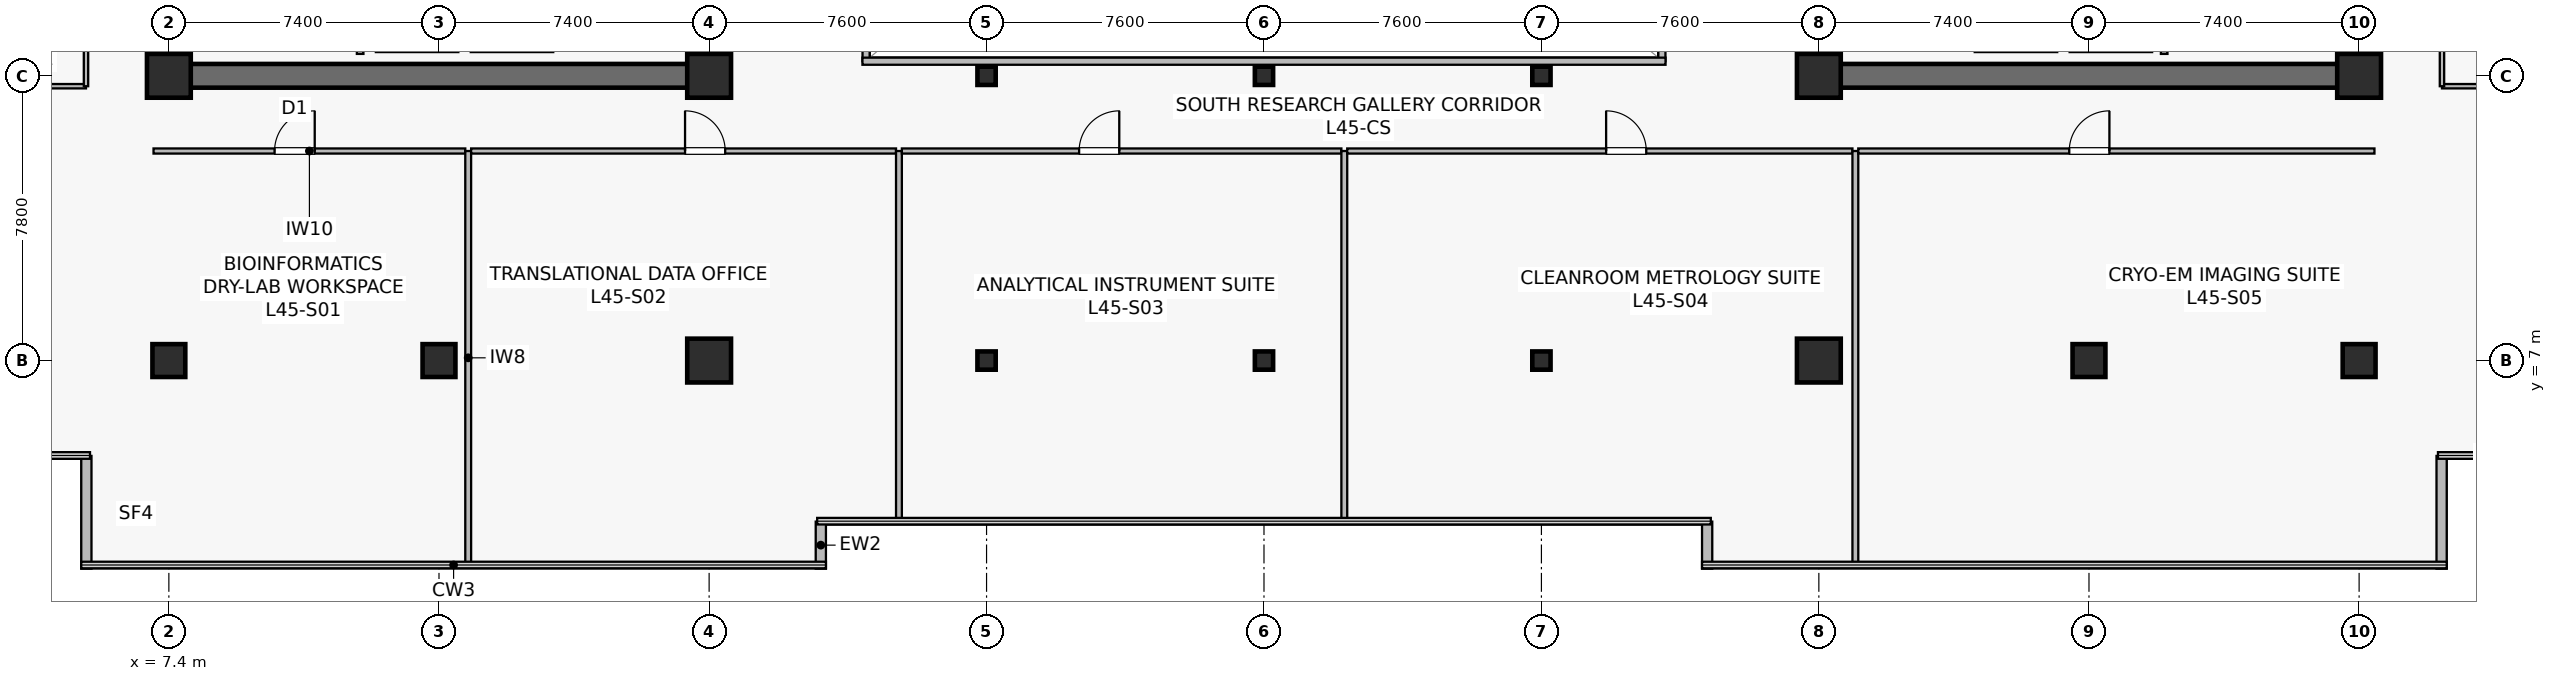
"""IFC4 building model, lengths in metres.
Left out: names, types, materials, properties, quantities, classifications, styles, units other than length and angle.
Written with IfcOpenShell. Run it as: python <this file> out.ifc"""

import sys

from ifc_helpers import new_model, si_unit, direction, frame, frame_2d, origin, origin_2d, place, context, subcontext, project, spatial, rectangle, hollow_rectangle, extrude, source, transform, mapped, element, fill, save


model = new_model("IFC4")
c1 = context("Model", 3, precision=1e-05, world=origin(), true_north=direction((0.0, 1.0)))
c2 = subcontext(c1, "Body", "Model", "MODEL_VIEW")
j1 = project(units=[si_unit("LENGTHUNIT", "METRE"), si_unit("PLANEANGLEUNIT", "RADIAN")], contexts=[c1])
p1 = place(None, origin())
s1 = spatial("IfcSite", under=j1, at=p1, CompositionType="ELEMENT")
p2 = place(p1, origin())
s2 = spatial("IfcBuilding", under=s1, at=p2, CompositionType="ELEMENT")
p3 = place(p2, frame((0.0, 0.0, 187.1)))
s3 = spatial("IfcBuildingStorey", under=s2, at=p3, CompositionType="ELEMENT", Elevation=187.1)
p4 = place(p3, frame((7.075, 14.8, 0.0), z_axis=(0.0, 0.0, 1.0), x_axis=(1.0, 0.0, 0.0)))
e1 = element("IfcWall", 1, at=p4, inside=s3, PredefinedType="SHEAR", context=c2, shape_type="SweptSolid", body=[
    extrude(rectangle(XDim=15.45, YDim=0.65, at=frame_2d((7.725, 0.0))), origin(), (0.0, 0.0, 1.0), 3.79),
])
p5 = place(p3, frame((7.4, 15.125, 0.0), z_axis=(0.0, 0.0, 1.0), x_axis=(0.0, 1.0, 0.0)))
e2 = element("IfcWall", 2, at=p5, inside=s3, PredefinedType="SHEAR", context=c2, shape_type="SweptSolid", body=[
    extrude(rectangle(XDim=18.35, YDim=0.65, at=frame_2d((9.175, 0.0))), origin(), (0.0, 0.0, 1.0), 3.79),
])
p6 = place(p3, frame((22.2, 15.125, 0.0), z_axis=(0.0, 0.0, 1.0), x_axis=(0.0, 1.0, 0.0)))
e3 = element("IfcWall", 3, at=p6, inside=s3, PredefinedType="SHEAR", context=c2, shape_type="SweptSolid", body=[
    extrude(rectangle(XDim=18.35, YDim=0.65, at=frame_2d((9.175, 0.0))), origin(), (0.0, 0.0, 1.0), 3.79),
])
p7 = place(p6, frame((3.425, 0.0, 0.0)))
e4 = element("IfcOpeningElement", 4, at=p7, cuts=e3, PredefinedType="OPENING", context=c2, shape_type="SweptSolid", body=[
    extrude(rectangle(XDim=1.42, YDim=2.2, at=frame_2d((0.71, 1.1))), frame((0.0, 0.335, 0.0), z_axis=(0.0, -1.0, 0.0), x_axis=(1.0, 0.0, 0.0)), (0.0, 0.0, 1.0), 0.67),
])
p8 = place(p3, frame((52.275, 14.8, 0.0), z_axis=(0.0, 0.0, 1.0), x_axis=(1.0, 0.0, 0.0)))
e5 = element("IfcWall", 5, at=p8, inside=s3, PredefinedType="SHEAR", context=c2, shape_type="SweptSolid", body=[
    extrude(rectangle(XDim=15.45, YDim=0.65, at=frame_2d((7.725, 0.0))), origin(), (0.0, 0.0, 1.0), 3.79),
])
p9 = place(p3, frame((52.6, 15.125, 0.0), z_axis=(0.0, 0.0, 1.0), x_axis=(0.0, 1.0, 0.0)))
e6 = element("IfcWall", 6, at=p9, inside=s3, PredefinedType="SHEAR", context=c2, shape_type="SweptSolid", body=[
    extrude(rectangle(XDim=18.35, YDim=0.65, at=frame_2d((9.175, 0.0))), origin(), (0.0, 0.0, 1.0), 3.79),
])
p10 = place(p9, frame((3.425, 0.0, 0.0)))
e7 = element("IfcOpeningElement", 7, at=p10, cuts=e6, PredefinedType="OPENING", context=c2, shape_type="SweptSolid", body=[
    extrude(rectangle(XDim=1.42, YDim=2.2, at=frame_2d((0.71, 1.1))), frame((0.0, 0.335, 0.0), z_axis=(0.0, -1.0, 0.0), x_axis=(1.0, 0.0, 0.0)), (0.0, 0.0, 1.0), 0.67),
])
p11 = place(p3, frame((67.4, 15.125, 0.0), z_axis=(0.0, 0.0, 1.0), x_axis=(0.0, 1.0, 0.0)))
e8 = element("IfcWall", 8, at=p11, inside=s3, PredefinedType="SHEAR", context=c2, shape_type="SweptSolid", body=[
    extrude(rectangle(XDim=18.35, YDim=0.65, at=frame_2d((9.175, 0.0))), origin(), (0.0, 0.0, 1.0), 3.79),
])
m1 = source(origin(), c2, "Body", "SweptSolid", [
    extrude(rectangle(XDim=0.9, YDim=0.9, at=origin_2d()), origin(), (0.0, 0.0, 1.0), 4.1),
])
p12 = place(p3, frame((14.8, 7.0, 0.0), z_axis=(0.0, 0.0, 1.0), x_axis=(1.0, 0.0, 0.0)))
e9 = element("IfcColumn", 9, at=p12, inside=s3, PredefinedType="COLUMN", context=c2, shape_type="MappedRepresentation", body=[
    mapped(m1, transform((0.0, 0.0, 0.0), scale=1.0)),
])
m2 = source(origin(), c2, "Body", "SweptSolid", [
    extrude(rectangle(XDim=1.2, YDim=1.2, at=origin_2d()), origin(), (0.0, 0.0, 1.0), 4.1),
])
for number, where, z_axis, x_axis in (
    (10, (22.2, 7.0, 0.0), (0.0, 0.0, 1.0), (1.0, 0.0, 0.0)),
    (11, (7.4, 14.8, 0.0), (0.0, 0.0, 1.0), (1.0, 0.0, 0.0)),
    (12, (22.2, 14.8, 0.0), (0.0, 0.0, 1.0), (1.0, 0.0, 0.0)),
    (13, (52.6, 7.0, 0.0), (0.0, 0.0, 1.0), (1.0, 0.0, 0.0)),
):
    element("IfcColumn", number, at=place(p3, frame(where, z_axis=z_axis, x_axis=x_axis)), inside=s3, PredefinedType="COLUMN", context=c2, shape_type="MappedRepresentation", body=[
        mapped(m2, transform((0.0, 0.0, 0.0), scale=1.0)),
    ])
p13 = place(p3, frame((60.0, 7.0, 0.0), z_axis=(0.0, 0.0, 1.0), x_axis=(1.0, 0.0, 0.0)))
e14 = element("IfcColumn", 14, at=p13, inside=s3, PredefinedType="COLUMN", context=c2, shape_type="MappedRepresentation", body=[
    mapped(m1, transform((0.0, 0.0, 0.0), scale=1.0)),
])
for number, where, z_axis, x_axis in (
    (15, (52.6, 14.8, 0.0), (0.0, 0.0, 1.0), (1.0, 0.0, 0.0)),
    (16, (67.4, 14.8, 0.0), (0.0, 0.0, 1.0), (1.0, 0.0, 0.0)),
):
    element("IfcColumn", number, at=place(p3, frame(where, z_axis=z_axis, x_axis=x_axis)), inside=s3, PredefinedType="COLUMN", context=c2, shape_type="MappedRepresentation", body=[
        mapped(m2, transform((0.0, 0.0, 0.0), scale=1.0)),
    ])
for number, where, z_axis, x_axis in (
    (17, (7.4, 7.0, 0.0), (0.0, 0.0, 1.0), (1.0, 0.0, 0.0)),
    (18, (67.4, 7.0, 0.0), (0.0, 0.0, 1.0), (1.0, 0.0, 0.0)),
):
    element("IfcColumn", number, at=place(p3, frame(where, z_axis=z_axis, x_axis=x_axis)), inside=s3, PredefinedType="COLUMN", context=c2, shape_type="MappedRepresentation", body=[
        mapped(m1, transform((0.0, 0.0, 0.0), scale=1.0)),
    ])
m3 = source(origin(), c2, "Body", "SweptSolid", [
    extrude(hollow_rectangle(XDim=0.5, YDim=0.5, WallThickness=0.022, at=origin_2d()), origin(), (0.0, 0.0, 1.0), 4.1),
])
for number, where, z_axis, x_axis in (
    (19, (29.8, 7.0, 0.0), (0.0, 0.0, 1.0), (1.0, 0.0, 0.0)),
    (20, (29.8, 14.8, 0.0), (0.0, 0.0, 1.0), (1.0, 0.0, 0.0)),
    (21, (37.4, 7.0, 0.0), (0.0, 0.0, 1.0), (1.0, 0.0, 0.0)),
    (22, (37.4, 14.8, 0.0), (0.0, 0.0, 1.0), (1.0, 0.0, 0.0)),
    (23, (45.0, 7.0, 0.0), (0.0, 0.0, 1.0), (1.0, 0.0, 0.0)),
    (24, (45.0, 14.8, 0.0), (0.0, 0.0, 1.0), (1.0, 0.0, 0.0)),
):
    element("IfcColumn", number, at=place(p3, frame(where, z_axis=z_axis, x_axis=x_axis)), inside=s3, PredefinedType="COLUMN", context=c2, shape_type="MappedRepresentation", body=[
        mapped(m3, transform((0.0, 0.0, 0.0), scale=1.0)),
    ])
for number, where, z_axis, x_axis in (
    (25, (25.26, 1.3, 0.0), (0.0, 0.0, 1.0), (0.0, 1.0, 0.0)),
    (26, (49.54, 2.588, 0.0), (0.0, 0.0, 1.0), (0.0, -1.0, 0.0)),
):
    element("IfcWall", number, at=place(p3, frame(where, z_axis=z_axis, x_axis=x_axis)), inside=s3, PredefinedType="STANDARD", context=c2, shape_type="SweptSolid", body=[
        extrude(rectangle(XDim=1.288, YDim=0.28, at=frame_2d((0.644, 0.0))), origin(), (0.0, 0.0, 1.0), 3.79),
    ])
for number, where, z_axis, x_axis in (
    (27, (69.66, 1.3, 0.0), (0.0, 0.0, 1.0), (0.0, 1.0, 0.0)),
    (28, (5.14, 4.388, 0.0), (0.0, 0.0, 1.0), (0.0, -1.0, 0.0)),
):
    element("IfcWall", number, at=place(p3, frame(where, z_axis=z_axis, x_axis=x_axis)), inside=s3, PredefinedType="STANDARD", context=c2, shape_type="SweptSolid", body=[
        extrude(rectangle(XDim=3.088, YDim=0.28, at=frame_2d((1.544, 0.0))), origin(), (0.0, 0.0, 1.0), 3.79),
    ])
p14 = place(p3, frame((13.07, 15.55, 0.0), z_axis=(0.0, 0.0, 1.0), x_axis=(1.0, 0.0, 0.0)))
e29 = element("IfcWall", 29, at=p14, inside=s3, PredefinedType="SOLIDWALL", context=c2, shape_type="SweptSolid", body=[
    extrude(rectangle(XDim=2.26, YDim=0.2, at=frame_2d((1.13, 0.0))), origin(), (0.0, 0.0, 1.0), 3.187),
])
p15 = place(p3, frame((15.67, 15.55, 0.0), z_axis=(0.0, 0.0, 1.0), x_axis=(1.0, 0.0, 0.0)))
e30 = element("IfcWall", 30, at=p15, inside=s3, PredefinedType="SOLIDWALL", context=c2, shape_type="SweptSolid", body=[
    extrude(rectangle(XDim=2.26, YDim=0.2, at=frame_2d((1.13, 0.0))), origin(), (0.0, 0.0, 1.0), 3.79),
])
p16 = place(p3, frame((12.64, 15.4, 0.0), z_axis=(0.0, 0.0, 1.0), x_axis=(0.0, 1.0, 0.0)))
e31 = element("IfcWall", 31, at=p16, inside=s3, PredefinedType="SOLIDWALL", context=c2, shape_type="SweptSolid", body=[
    extrude(rectangle(XDim=2.4, YDim=0.18, at=frame_2d((1.2, 0.0))), origin(), (0.0, 0.0, 1.0), 3.79),
])
p17 = place(p3, frame((59.47, 15.55, 0.0), z_axis=(0.0, 0.0, 1.0), x_axis=(1.0, 0.0, 0.0)))
e32 = element("IfcWall", 32, at=p17, inside=s3, PredefinedType="SOLIDWALL", context=c2, shape_type="SweptSolid", body=[
    extrude(rectangle(XDim=2.26, YDim=0.2, at=frame_2d((1.13, 0.0))), origin(), (0.0, 0.0, 1.0), 3.187),
])
p18 = place(p3, frame((56.87, 15.55, 0.0), z_axis=(0.0, 0.0, 1.0), x_axis=(1.0, 0.0, 0.0)))
e33 = element("IfcWall", 33, at=p18, inside=s3, PredefinedType="SOLIDWALL", context=c2, shape_type="SweptSolid", body=[
    extrude(rectangle(XDim=2.26, YDim=0.2, at=frame_2d((1.13, 0.0))), origin(), (0.0, 0.0, 1.0), 3.79),
])
p19 = place(p3, frame((62.06, 15.4, 0.0), z_axis=(0.0, 0.0, 1.0), x_axis=(0.0, 1.0, 0.0)))
e34 = element("IfcWall", 34, at=p19, inside=s3, PredefinedType="SOLIDWALL", context=c2, shape_type="SweptSolid", body=[
    extrude(rectangle(XDim=2.4, YDim=0.18, at=frame_2d((1.2, 0.0))), origin(), (0.0, 0.0, 1.0), 3.79),
])
p20 = place(p3, frame((26.5, 15.2, 0.0), z_axis=(0.0, 0.0, 1.0), x_axis=(0.0, 1.0, 0.0)))
e35 = element("IfcWall", 35, at=p20, inside=s3, PredefinedType="SOLIDWALL", context=c2, shape_type="SweptSolid", body=[
    extrude(rectangle(XDim=18.2, YDim=0.195, at=frame_2d((9.1, 0.0))), origin(), (0.0, 0.0, 1.0), 3.79),
])
p21 = place(p20, frame((1.8, 0.0, 0.9)))
e36 = element("IfcOpeningElement", 36, at=p21, cuts=e35, PredefinedType="OPENING", context=c2, shape_type="SweptSolid", body=[
    extrude(rectangle(XDim=1.2, YDim=1.35, at=frame_2d((0.6, 0.675))), frame((0.0, 0.107, 0.0), z_axis=(0.0, -1.0, 0.0), x_axis=(1.0, 0.0, 0.0)), (0.0, 0.0, 1.0), 0.215),
])
p22 = place(p20, frame((13.2, 0.0, 0.9)))
e37 = element("IfcOpeningElement", 37, at=p22, cuts=e35, PredefinedType="OPENING", context=c2, shape_type="SweptSolid", body=[
    extrude(rectangle(XDim=1.2, YDim=1.35, at=frame_2d((0.6, 0.675))), frame((0.0, 0.107, 0.0), z_axis=(0.0, -1.0, 0.0), x_axis=(1.0, 0.0, 0.0)), (0.0, 0.0, 1.0), 0.215),
])
p23 = place(p3, frame((48.3, 15.2, 0.0), z_axis=(0.0, 0.0, 1.0), x_axis=(0.0, 1.0, 0.0)))
e38 = element("IfcWall", 38, at=p23, inside=s3, PredefinedType="SOLIDWALL", context=c2, shape_type="SweptSolid", body=[
    extrude(rectangle(XDim=18.2, YDim=0.195, at=frame_2d((9.1, 0.0))), origin(), (0.0, 0.0, 1.0), 3.79),
])
p24 = place(p23, frame((1.8, 0.0, 0.9)))
e39 = element("IfcOpeningElement", 39, at=p24, cuts=e38, PredefinedType="OPENING", context=c2, shape_type="SweptSolid", body=[
    extrude(rectangle(XDim=1.2, YDim=1.35, at=frame_2d((0.6, 0.675))), frame((0.0, 0.107, 0.0), z_axis=(0.0, -1.0, 0.0), x_axis=(1.0, 0.0, 0.0)), (0.0, 0.0, 1.0), 0.215),
])
p25 = place(p23, frame((13.2, 0.0, 0.9)))
e40 = element("IfcOpeningElement", 40, at=p25, cuts=e38, PredefinedType="OPENING", context=c2, shape_type="SweptSolid", body=[
    extrude(rectangle(XDim=1.2, YDim=1.35, at=frame_2d((0.6, 0.675))), frame((0.0, 0.107, 0.0), z_axis=(0.0, -1.0, 0.0), x_axis=(1.0, 0.0, 0.0)), (0.0, 0.0, 1.0), 0.215),
])
p26 = place(p3, frame((26.4, 15.2, 0.0), z_axis=(0.0, 0.0, 1.0), x_axis=(1.0, 0.0, 0.0)))
e41 = element("IfcWall", 41, at=p26, inside=s3, PredefinedType="SOLIDWALL", context=c2, shape_type="SweptSolid", body=[
    extrude(rectangle(XDim=22.0, YDim=0.195, at=frame_2d((11.0, 0.0))), origin(), (0.0, 0.0, 1.0), 3.79),
])
p27 = place(p3, frame((6.98, 12.74, 0.0), z_axis=(0.0, 0.0, 1.0), x_axis=(1.0, 0.0, 0.0)))
e42 = element("IfcWall", 42, at=p27, inside=s3, PredefinedType="PARTITIONING", context=c2, shape_type="SweptSolid", body=[
    extrude(rectangle(XDim=8.54, YDim=0.14, at=frame_2d((4.27, 0.0))), origin(), (0.0, 0.0, 1.0), 3.187),
])
p28 = place(p27, frame((3.316, 0.0, 0.0)))
e43 = element("IfcOpeningElement", 43, at=p28, cuts=e42, PredefinedType="OPENING", context=c2, shape_type="SweptSolid", body=[
    extrude(rectangle(XDim=1.1, YDim=2.18, at=frame_2d((0.55, 1.09))), frame((0.0, 0.08, 0.0), z_axis=(0.0, -1.0, 0.0), x_axis=(1.0, 0.0, 0.0)), (0.0, 0.0, 1.0), 0.16),
])
p29 = place(p3, frame((15.6, 1.41, 0.0), z_axis=(0.0, 0.0, 1.0), x_axis=(0.0, 1.0, 0.0)))
e44 = element("IfcWall", 44, at=p29, inside=s3, PredefinedType="PARTITIONING", context=c2, shape_type="SweptSolid", body=[
    extrude(rectangle(XDim=11.33, YDim=0.16, at=frame_2d((5.665, 0.0))), origin(), (0.0, 0.0, 1.0), 3.075),
])
p30 = place(p3, frame((15.68, 12.74, 0.0), z_axis=(0.0, 0.0, 1.0), x_axis=(1.0, 0.0, 0.0)))
e45 = element("IfcWall", 45, at=p30, inside=s3, PredefinedType="PARTITIONING", context=c2, shape_type="SweptSolid", body=[
    extrude(rectangle(XDim=11.64, YDim=0.14, at=frame_2d((5.82, 0.0))), origin(), (0.0, 0.0, 1.0), 3.187),
])
p31 = place(p30, frame((5.86, 0.0, 0.0)))
e46 = element("IfcOpeningElement", 46, at=p31, cuts=e45, PredefinedType="OPENING", context=c2, shape_type="SweptSolid", body=[
    extrude(rectangle(XDim=1.1, YDim=2.18, at=frame_2d((0.55, 1.09))), frame((0.0, 0.08, 0.0), z_axis=(0.0, -1.0, 0.0), x_axis=(1.0, 0.0, 0.0)), (0.0, 0.0, 1.0), 0.16),
])
p32 = place(p3, frame((27.4, 2.61, 0.0), z_axis=(0.0, 0.0, 1.0), x_axis=(0.0, 1.0, 0.0)))
e47 = element("IfcWall", 47, at=p32, inside=s3, PredefinedType="PARTITIONING", context=c2, shape_type="SweptSolid", body=[
    extrude(rectangle(XDim=10.13, YDim=0.16, at=frame_2d((5.065, 0.0))), origin(), (0.0, 0.0, 1.0), 3.075),
])
p33 = place(p3, frame((27.48, 12.74, 0.0), z_axis=(0.0, 0.0, 1.0), x_axis=(1.0, 0.0, 0.0)))
e48 = element("IfcWall", 48, at=p33, inside=s3, PredefinedType="PARTITIONING", context=c2, shape_type="SweptSolid", body=[
    extrude(rectangle(XDim=12.04, YDim=0.14, at=frame_2d((6.02, 0.0))), origin(), (0.0, 0.0, 1.0), 3.187),
])
p34 = place(p33, frame((4.856, 0.0, 0.0)))
e49 = element("IfcOpeningElement", 49, at=p34, cuts=e48, PredefinedType="OPENING", context=c2, shape_type="SweptSolid", body=[
    extrude(rectangle(XDim=1.1, YDim=2.18, at=frame_2d((0.55, 1.09))), frame((0.0, 0.08, 0.0), z_axis=(0.0, -1.0, 0.0), x_axis=(1.0, 0.0, 0.0)), (0.0, 0.0, 1.0), 0.16),
])
p35 = place(p3, frame((39.6, 2.61, 0.0), z_axis=(0.0, 0.0, 1.0), x_axis=(0.0, 1.0, 0.0)))
e50 = element("IfcWall", 50, at=p35, inside=s3, PredefinedType="PARTITIONING", context=c2, shape_type="SweptSolid", body=[
    extrude(rectangle(XDim=10.13, YDim=0.16, at=frame_2d((5.065, 0.0))), origin(), (0.0, 0.0, 1.0), 3.075),
])
p36 = place(p3, frame((39.68, 12.74, 0.0), z_axis=(0.0, 0.0, 1.0), x_axis=(1.0, 0.0, 0.0)))
e51 = element("IfcWall", 51, at=p36, inside=s3, PredefinedType="PARTITIONING", context=c2, shape_type="SweptSolid", body=[
    extrude(rectangle(XDim=13.84, YDim=0.14, at=frame_2d((6.92, 0.0))), origin(), (0.0, 0.0, 1.0), 3.187),
])
p37 = place(p36, frame((7.092, 0.0, 0.0)))
e52 = element("IfcOpeningElement", 52, at=p37, cuts=e51, PredefinedType="OPENING", context=c2, shape_type="SweptSolid", body=[
    extrude(rectangle(XDim=1.1, YDim=2.18, at=frame_2d((0.55, 1.09))), frame((0.0, 0.08, 0.0), z_axis=(0.0, -1.0, 0.0), x_axis=(1.0, 0.0, 0.0)), (0.0, 0.0, 1.0), 0.16),
])
p38 = place(p3, frame((53.6, 1.41, 0.0), z_axis=(0.0, 0.0, 1.0), x_axis=(0.0, 1.0, 0.0)))
e53 = element("IfcWall", 53, at=p38, inside=s3, PredefinedType="PARTITIONING", context=c2, shape_type="SweptSolid", body=[
    extrude(rectangle(XDim=11.33, YDim=0.16, at=frame_2d((5.665, 0.0))), origin(), (0.0, 0.0, 1.0), 3.075),
])
p39 = place(p3, frame((53.68, 12.74, 0.0), z_axis=(0.0, 0.0, 1.0), x_axis=(1.0, 0.0, 0.0)))
e54 = element("IfcWall", 54, at=p39, inside=s3, PredefinedType="PARTITIONING", context=c2, shape_type="SweptSolid", body=[
    extrude(rectangle(XDim=14.14, YDim=0.14, at=frame_2d((7.07, 0.0))), origin(), (0.0, 0.0, 1.0), 3.187),
])
p40 = place(p39, frame((5.78, 0.0, 0.0)))
e55 = element("IfcOpeningElement", 55, at=p40, cuts=e54, PredefinedType="OPENING", context=c2, shape_type="SweptSolid", body=[
    extrude(rectangle(XDim=1.1, YDim=2.18, at=frame_2d((0.55, 1.09))), frame((0.0, 0.08, 0.0), z_axis=(0.0, -1.0, 0.0), x_axis=(1.0, 0.0, 0.0)), (0.0, 0.0, 1.0), 0.16),
])
p41 = place(p3, frame((2.11, 14.515, 0.0), z_axis=(0.0, 0.0, 1.0), x_axis=(1.0, 0.0, 0.0)))
e56 = element("IfcWall", 56, at=p41, inside=s3, PredefinedType="PARTITIONING", context=c2, shape_type="SweptSolid", body=[
    extrude(rectangle(XDim=3.02, YDim=0.12, at=frame_2d((1.51, 0.0))), origin(), (0.0, 0.0, 1.0), 3.79),
])
p42 = place(p3, frame((5.13, 14.515, 0.0), z_axis=(0.0, 0.0, 1.0), x_axis=(0.0, 1.0, 0.0)))
e57 = element("IfcWall", 57, at=p42, inside=s3, PredefinedType="PARTITIONING", context=c2, shape_type="SweptSolid", body=[
    extrude(rectangle(XDim=19.57, YDim=0.12, at=frame_2d((9.785, 0.0))), origin(), (0.0, 0.0, 1.0), 3.79),
])
p43 = place(p42, frame((9.335, 0.0, 0.0)))
e58 = element("IfcOpeningElement", 58, at=p43, cuts=e57, PredefinedType="OPENING", context=c2, shape_type="SweptSolid", body=[
    extrude(rectangle(XDim=0.9, YDim=2.1, at=frame_2d((0.45, 1.05))), frame((0.0, 0.07, 0.0), z_axis=(0.0, -1.0, 0.0), x_axis=(1.0, 0.0, 0.0)), (0.0, 0.0, 1.0), 0.14),
])
p44 = place(p3, frame((69.67, 14.515, 0.0), z_axis=(0.0, 0.0, 1.0), x_axis=(1.0, 0.0, 0.0)))
e59 = element("IfcWall", 59, at=p44, inside=s3, PredefinedType="PARTITIONING", context=c2, shape_type="SweptSolid", body=[
    extrude(rectangle(XDim=3.02, YDim=0.12, at=frame_2d((1.51, 0.0))), origin(), (0.0, 0.0, 1.0), 3.79),
])
p45 = place(p3, frame((69.67, 14.515, 0.0), z_axis=(0.0, 0.0, 1.0), x_axis=(0.0, 1.0, 0.0)))
e60 = element("IfcWall", 60, at=p45, inside=s3, PredefinedType="PARTITIONING", context=c2, shape_type="SweptSolid", body=[
    extrude(rectangle(XDim=9.025, YDim=0.12, at=frame_2d((4.513, 0.0))), origin(), (0.0, 0.0, 1.0), 3.79),
])
p46 = place(p45, frame((4.062, 0.0, 0.0)))
e61 = element("IfcOpeningElement", 61, at=p46, cuts=e60, PredefinedType="OPENING", context=c2, shape_type="SweptSolid", body=[
    extrude(rectangle(XDim=0.9, YDim=2.1, at=frame_2d((0.45, 1.05))), frame((0.0, 0.07, 0.0), z_axis=(0.0, -1.0, 0.0), x_axis=(1.0, 0.0, 0.0)), (0.0, 0.0, 1.0), 0.14),
])
m4 = source(origin(), c2, "Body", "SweptSolid", [
    extrude(rectangle(XDim=1.1, YDim=2.18, at=frame_2d((0.55, 1.09))), frame((0.0, 0.025, 0.0), z_axis=(0.0, -1.0, 0.0), x_axis=(1.0, 0.0, 0.0)), (0.0, 0.0, 1.0), 0.05),
])
p47 = place(p28, origin())
e62 = element("IfcDoor", 62, at=p47, inside=s3, OperationType="SINGLE_SWING_RIGHT", PredefinedType="DOOR", context=c2, shape_type="MappedRepresentation", body=[
    mapped(m4, transform((0.0, 0.0, 0.0), scale=1.0)),
])
fill(e43, e62)
p48 = place(p31, origin())
e63 = element("IfcDoor", 63, at=p48, inside=s3, OperationType="SINGLE_SWING_LEFT", PredefinedType="DOOR", context=c2, shape_type="MappedRepresentation", body=[
    mapped(m4, transform((0.0, 0.0, 0.0), scale=1.0)),
])
fill(e46, e63)
p49 = place(p34, origin())
e64 = element("IfcDoor", 64, at=p49, inside=s3, OperationType="SINGLE_SWING_RIGHT", PredefinedType="DOOR", context=c2, shape_type="MappedRepresentation", body=[
    mapped(m4, transform((0.0, 0.0, 0.0), scale=1.0)),
])
fill(e49, e64)
p50 = place(p37, origin())
e65 = element("IfcDoor", 65, at=p50, inside=s3, OperationType="SINGLE_SWING_LEFT", PredefinedType="DOOR", context=c2, shape_type="MappedRepresentation", body=[
    mapped(m4, transform((0.0, 0.0, 0.0), scale=1.0)),
])
fill(e52, e65)
p51 = place(p40, origin())
e66 = element("IfcDoor", 66, at=p51, inside=s3, OperationType="SINGLE_SWING_RIGHT", PredefinedType="DOOR", context=c2, shape_type="MappedRepresentation", body=[
    mapped(m4, transform((0.0, 0.0, 0.0), scale=1.0)),
])
fill(e55, e66)
save(model, sys.argv[1])
